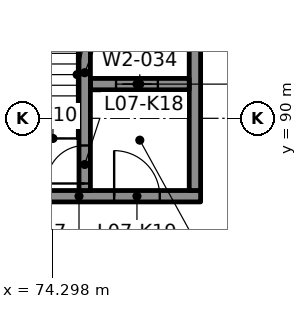
"""IFC4 building model, lengths in metres.
Left out: names, types, materials, properties, quantities, classifications, styles, units other than length and angle.
Written with IfcOpenShell. Run it as: python <this file> out.ifc"""

import sys

from ifc_helpers import new_model, si_unit, direction, frame, frame_2d, origin, place, context, subcontext, project, spatial, rectangle, extrude, element, fill, save


model = new_model("IFC4")
c1 = context("Model", 3, precision=1e-05, world=origin(), true_north=direction((0.0, 1.0)))
c2 = subcontext(c1, "Body", "Model", "MODEL_VIEW")
j1 = project(units=[si_unit("LENGTHUNIT", "METRE"), si_unit("PLANEANGLEUNIT", "RADIAN")], contexts=[c1])
p1 = place(None, origin())
s1 = spatial("IfcSite", under=j1, at=p1, CompositionType="ELEMENT")
p2 = place(p1, origin())
s2 = spatial("IfcBuilding", under=s1, at=p2, CompositionType="ELEMENT")
p3 = place(p2, frame((0.0, 0.0, 35.5)))
s3 = spatial("IfcBuildingStorey", under=s2, at=p3, CompositionType="ELEMENT", Elevation=35.5)
p4 = place(p3, frame((71.8, 87.95, 0.0), z_axis=(0.0, 0.0, 1.0), x_axis=(1.0, 0.0, 0.0)))
e1 = element("IfcWall", 1, at=p4, inside=s3, PredefinedType="SHEAR", context=c2, shape_type="SweptSolid", body=[
    extrude(rectangle(XDim=6.4, YDim=0.3, at=frame_2d((3.2, 0.0))), origin(), (0.0, 0.0, 1.0), 4.3),
])
p5 = place(p4, frame((1.325, 0.0, 0.0)))
e2 = element("IfcOpeningElement", 2, at=p5, cuts=e1, PredefinedType="OPENING", context=c2, shape_type="SweptSolid", body=[
    extrude(rectangle(XDim=1.0, YDim=2.1, at=frame_2d((0.5, 1.05))), frame((0.0, 0.16, 0.0), z_axis=(0.0, -1.0, 0.0), x_axis=(1.0, 0.0, 0.0)), (0.0, 0.0, 1.0), 0.32),
])
p6 = place(p4, frame((4.125, 0.0, 0.0)))
e3 = element("IfcOpeningElement", 3, at=p6, cuts=e1, PredefinedType="OPENING", context=c2, shape_type="SweptSolid", body=[
    extrude(rectangle(XDim=1.2, YDim=2.1, at=frame_2d((0.6, 1.05))), frame((0.0, 0.16, 0.0), z_axis=(0.0, -1.0, 0.0), x_axis=(1.0, 0.0, 0.0)), (0.0, 0.0, 1.0), 0.32),
])
p7 = place(p3, frame((78.05, 88.1, 0.0), z_axis=(0.0, 0.0, 1.0), x_axis=(0.0, 1.0, 0.0)))
e4 = element("IfcWall", 4, at=p7, inside=s3, PredefinedType="SHEAR", context=c2, shape_type="SweptSolid", body=[
    extrude(rectangle(XDim=6.2, YDim=0.3, at=frame_2d((3.1, 0.0))), origin(), (0.0, 0.0, 1.0), 4.3),
])
p8 = place(p3, frame((75.3, 90.9, 0.0), z_axis=(0.0, 0.0, 1.0), x_axis=(1.0, 0.0, 0.0)))
e5 = element("IfcWall", 5, at=p8, inside=s3, PredefinedType="SHEAR", context=c2, shape_type="SweptSolid", body=[
    extrude(rectangle(XDim=2.6, YDim=0.3, at=frame_2d((1.3, 0.0))), origin(), (0.0, 0.0, 1.0), 4.3),
])
p9 = place(p8, frame((0.675, 0.0, 0.0)))
e6 = element("IfcOpeningElement", 6, at=p9, cuts=e5, PredefinedType="OPENING", context=c2, shape_type="SweptSolid", body=[
    extrude(rectangle(XDim=1.1, YDim=2.1, at=frame_2d((0.55, 1.05))), frame((0.0, 0.16, 0.0), z_axis=(0.0, -1.0, 0.0), x_axis=(1.0, 0.0, 0.0)), (0.0, 0.0, 1.0), 0.32),
])
p10 = place(p3, frame((75.15, 88.1, 0.0), z_axis=(0.0, 0.0, 1.0), x_axis=(0.0, 1.0, 0.0)))
e7 = element("IfcWall", 7, at=p10, inside=s3, PredefinedType="SHEAR", context=c2, shape_type="SweptSolid", body=[
    extrude(rectangle(XDim=6.2, YDim=0.3, at=frame_2d((3.1, 0.0))), origin(), (0.0, 0.0, 1.0), 4.3),
])
p11 = place(p10, frame((0.185, 0.0, 0.0)))
e8 = element("IfcOpeningElement", 8, at=p11, cuts=e7, PredefinedType="OPENING", context=c2, shape_type="SweptSolid", body=[
    extrude(rectangle(XDim=1.0, YDim=2.1, at=frame_2d((0.5, 1.05))), frame((0.0, 0.16, 0.0), z_axis=(0.0, -1.0, 0.0), x_axis=(1.0, 0.0, 0.0)), (0.0, 0.0, 1.0), 0.32),
])
p12 = place(p3, frame((107.504, 60.451, 0.0), z_axis=(0.0, 0.0, 1.0), x_axis=(-0.500000550228, 0.86602508611, 0.0)))
e9 = element("IfcWall", 9, at=p12, inside=s3, PredefinedType="SOLIDWALL", context=c2, shape_type="SweptSolid", body=[
    extrude(rectangle(XDim=57.704, YDim=0.3, at=frame_2d((28.852, 0.0))), origin(), (0.0, 0.0, 1.0), 4.3),
])
p13 = place(p12, frame((0.89, 0.0, 0.8)))
e10 = element("IfcOpeningElement", 10, at=p13, cuts=e9, PredefinedType="OPENING", context=c2, shape_type="SweptSolid", body=[
    extrude(rectangle(XDim=3.0, YDim=2.4, at=frame_2d((1.5, 1.2))), frame((0.0, 0.16, 0.0), z_axis=(0.0, -1.0, 0.0), x_axis=(1.0, 0.0, 0.0)), (0.0, 0.0, 1.0), 0.32),
])
p14 = place(p12, frame((4.67, 0.0, 0.8)))
e11 = element("IfcOpeningElement", 11, at=p14, cuts=e9, PredefinedType="OPENING", context=c2, shape_type="SweptSolid", body=[
    extrude(rectangle(XDim=3.0, YDim=2.4, at=frame_2d((1.5, 1.2))), frame((0.0, 0.16, 0.0), z_axis=(0.0, -1.0, 0.0), x_axis=(1.0, 0.0, 0.0)), (0.0, 0.0, 1.0), 0.32),
])
p15 = place(p12, frame((8.451, 0.0, 0.8)))
e12 = element("IfcOpeningElement", 12, at=p15, cuts=e9, PredefinedType="OPENING", context=c2, shape_type="SweptSolid", body=[
    extrude(rectangle(XDim=3.0, YDim=2.4, at=frame_2d((1.5, 1.2))), frame((0.0, 0.16, 0.0), z_axis=(0.0, -1.0, 0.0), x_axis=(1.0, 0.0, 0.0)), (0.0, 0.0, 1.0), 0.32),
])
p16 = place(p12, frame((12.231, 0.0, 0.8)))
e13 = element("IfcOpeningElement", 13, at=p16, cuts=e9, PredefinedType="OPENING", context=c2, shape_type="SweptSolid", body=[
    extrude(rectangle(XDim=3.0, YDim=2.4, at=frame_2d((1.5, 1.2))), frame((0.0, 0.16, 0.0), z_axis=(0.0, -1.0, 0.0), x_axis=(1.0, 0.0, 0.0)), (0.0, 0.0, 1.0), 0.32),
])
p17 = place(p12, frame((16.011, 0.0, 0.8)))
e14 = element("IfcOpeningElement", 14, at=p17, cuts=e9, PredefinedType="OPENING", context=c2, shape_type="SweptSolid", body=[
    extrude(rectangle(XDim=3.0, YDim=2.4, at=frame_2d((1.5, 1.2))), frame((0.0, 0.16, 0.0), z_axis=(0.0, -1.0, 0.0), x_axis=(1.0, 0.0, 0.0)), (0.0, 0.0, 1.0), 0.32),
])
p18 = place(p12, frame((19.792, 0.0, 0.8)))
e15 = element("IfcOpeningElement", 15, at=p18, cuts=e9, PredefinedType="OPENING", context=c2, shape_type="SweptSolid", body=[
    extrude(rectangle(XDim=3.0, YDim=2.4, at=frame_2d((1.5, 1.2))), frame((0.0, 0.16, 0.0), z_axis=(0.0, -1.0, 0.0), x_axis=(1.0, 0.0, 0.0)), (0.0, 0.0, 1.0), 0.32),
])
p19 = place(p12, frame((23.572, 0.0, 0.8)))
e16 = element("IfcOpeningElement", 16, at=p19, cuts=e9, PredefinedType="OPENING", context=c2, shape_type="SweptSolid", body=[
    extrude(rectangle(XDim=3.0, YDim=2.4, at=frame_2d((1.5, 1.2))), frame((0.0, 0.16, 0.0), z_axis=(0.0, -1.0, 0.0), x_axis=(1.0, 0.0, 0.0)), (0.0, 0.0, 1.0), 0.32),
])
p20 = place(p12, frame((27.352, 0.0, 0.8)))
e17 = element("IfcOpeningElement", 17, at=p20, cuts=e9, PredefinedType="OPENING", context=c2, shape_type="SweptSolid", body=[
    extrude(rectangle(XDim=3.0, YDim=2.4, at=frame_2d((1.5, 1.2))), frame((0.0, 0.16, 0.0), z_axis=(0.0, -1.0, 0.0), x_axis=(1.0, 0.0, 0.0)), (0.0, 0.0, 1.0), 0.32),
])
p21 = place(p12, frame((31.132, 0.0, 0.8)))
e18 = element("IfcOpeningElement", 18, at=p21, cuts=e9, PredefinedType="OPENING", context=c2, shape_type="SweptSolid", body=[
    extrude(rectangle(XDim=3.0, YDim=2.4, at=frame_2d((1.5, 1.2))), frame((0.0, 0.16, 0.0), z_axis=(0.0, -1.0, 0.0), x_axis=(1.0, 0.0, 0.0)), (0.0, 0.0, 1.0), 0.32),
])
p22 = place(p12, frame((34.913, 0.0, 0.8)))
e19 = element("IfcOpeningElement", 19, at=p22, cuts=e9, PredefinedType="OPENING", context=c2, shape_type="SweptSolid", body=[
    extrude(rectangle(XDim=3.0, YDim=2.4, at=frame_2d((1.5, 1.2))), frame((0.0, 0.16, 0.0), z_axis=(0.0, -1.0, 0.0), x_axis=(1.0, 0.0, 0.0)), (0.0, 0.0, 1.0), 0.32),
])
p23 = place(p12, frame((38.693, 0.0, 0.8)))
e20 = element("IfcOpeningElement", 20, at=p23, cuts=e9, PredefinedType="OPENING", context=c2, shape_type="SweptSolid", body=[
    extrude(rectangle(XDim=3.0, YDim=2.4, at=frame_2d((1.5, 1.2))), frame((0.0, 0.16, 0.0), z_axis=(0.0, -1.0, 0.0), x_axis=(1.0, 0.0, 0.0)), (0.0, 0.0, 1.0), 0.32),
])
p24 = place(p12, frame((42.473, 0.0, 0.8)))
e21 = element("IfcOpeningElement", 21, at=p24, cuts=e9, PredefinedType="OPENING", context=c2, shape_type="SweptSolid", body=[
    extrude(rectangle(XDim=3.0, YDim=2.4, at=frame_2d((1.5, 1.2))), frame((0.0, 0.16, 0.0), z_axis=(0.0, -1.0, 0.0), x_axis=(1.0, 0.0, 0.0)), (0.0, 0.0, 1.0), 0.32),
])
p25 = place(p12, frame((46.253, 0.0, 0.8)))
e22 = element("IfcOpeningElement", 22, at=p25, cuts=e9, PredefinedType="OPENING", context=c2, shape_type="SweptSolid", body=[
    extrude(rectangle(XDim=3.0, YDim=2.4, at=frame_2d((1.5, 1.2))), frame((0.0, 0.16, 0.0), z_axis=(0.0, -1.0, 0.0), x_axis=(1.0, 0.0, 0.0)), (0.0, 0.0, 1.0), 0.32),
])
p26 = place(p12, frame((50.033, 0.0, 0.8)))
e23 = element("IfcOpeningElement", 23, at=p26, cuts=e9, PredefinedType="OPENING", context=c2, shape_type="SweptSolid", body=[
    extrude(rectangle(XDim=3.0, YDim=2.4, at=frame_2d((1.5, 1.2))), frame((0.0, 0.16, 0.0), z_axis=(0.0, -1.0, 0.0), x_axis=(1.0, 0.0, 0.0)), (0.0, 0.0, 1.0), 0.32),
])
p27 = place(p12, frame((53.814, 0.0, 0.8)))
e24 = element("IfcOpeningElement", 24, at=p27, cuts=e9, PredefinedType="OPENING", context=c2, shape_type="SweptSolid", body=[
    extrude(rectangle(XDim=3.0, YDim=2.4, at=frame_2d((1.5, 1.2))), frame((0.0, 0.16, 0.0), z_axis=(0.0, -1.0, 0.0), x_axis=(1.0, 0.0, 0.0)), (0.0, 0.0, 1.0), 0.32),
])
p28 = place(p9, origin())
e25 = element("IfcDoor", 25, at=p28, inside=s3, OperationType="DOUBLE_DOOR_SLIDING", PredefinedType="DOOR", context=c2, shape_type="SweptSolid", body=[
    extrude(rectangle(XDim=1.1, YDim=2.1, at=frame_2d((0.55, 1.05))), frame((0.0, 0.025, 0.0), z_axis=(0.0, -1.0, 0.0), x_axis=(1.0, 0.0, 0.0)), (0.0, 0.0, 1.0), 0.05),
])
fill(e6, e25)
p29 = place(p11, origin())
e26 = element("IfcDoor", 26, at=p29, inside=s3, OperationType="SINGLE_SWING_LEFT", PredefinedType="DOOR", context=c2, shape_type="SweptSolid", body=[
    extrude(rectangle(XDim=1.0, YDim=2.1, at=frame_2d((0.5, 1.05))), frame((0.0, 0.025, 0.0), z_axis=(0.0, -1.0, 0.0), x_axis=(1.0, 0.0, 0.0)), (0.0, 0.0, 1.0), 0.05),
])
fill(e8, e26)
p30 = place(p6, origin())
e27 = element("IfcDoor", 27, at=p30, inside=s3, OperationType="SINGLE_SWING_RIGHT", PredefinedType="DOOR", context=c2, shape_type="SweptSolid", body=[
    extrude(rectangle(XDim=1.2, YDim=2.1, at=frame_2d((0.6, 1.05))), frame((0.0, 0.025, 0.0), z_axis=(0.0, -1.0, 0.0), x_axis=(1.0, 0.0, 0.0)), (0.0, 0.0, 1.0), 0.05),
])
fill(e3, e27)
save(model, sys.argv[1])
